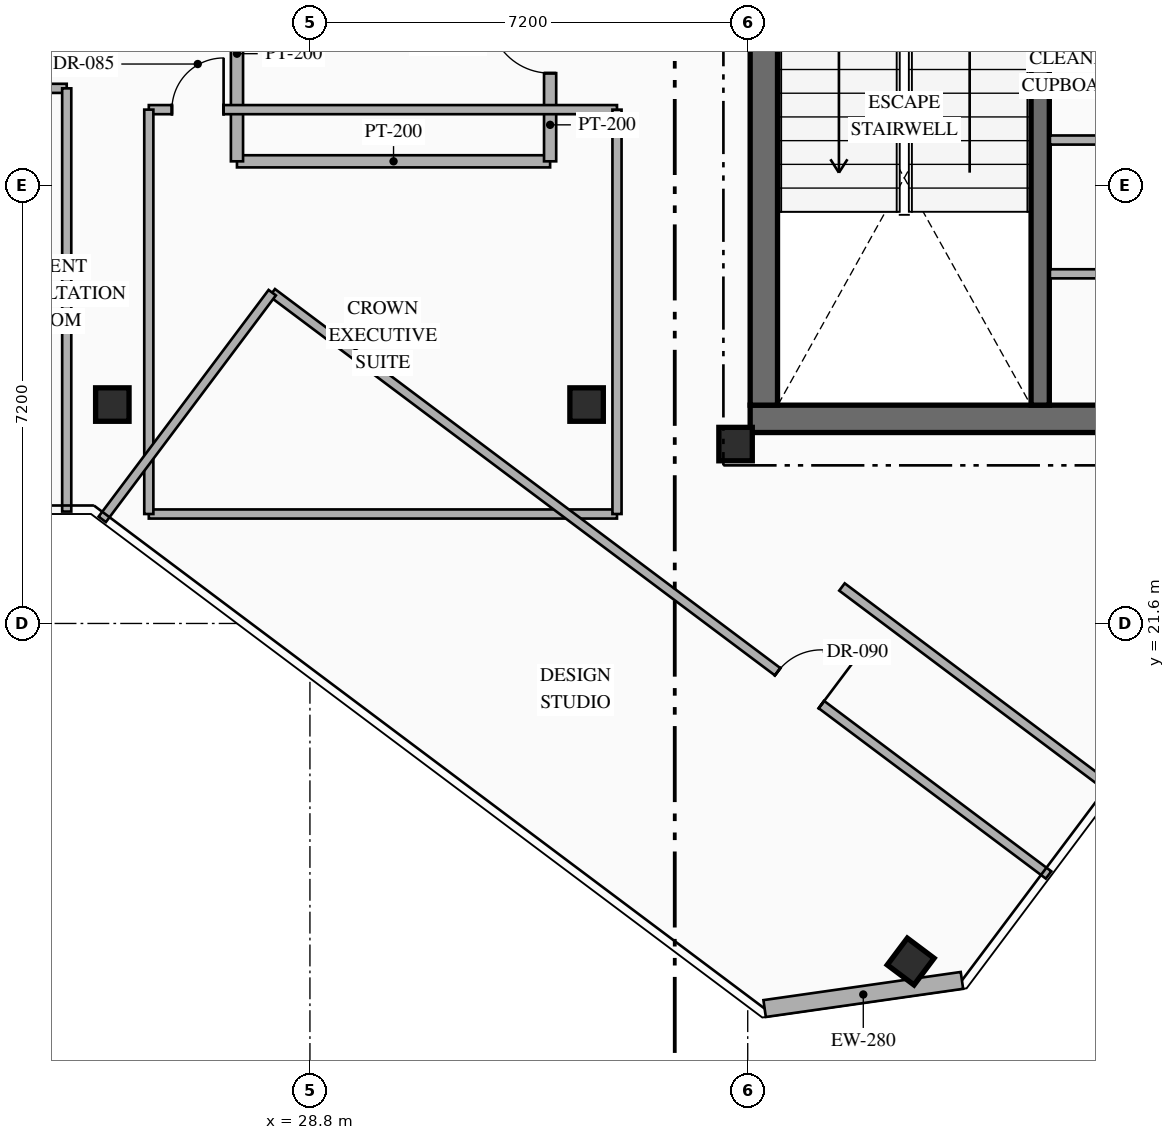
"""IFC4 building model, lengths in metres.
Left out: names, types, materials, properties, quantities, classifications, styles, units other than length and angle.
Written with IfcOpenShell. Run it as: python <this file> out.ifc"""

import sys

from ifc_helpers import new_model, si_unit, direction, frame, frame_2d, origin, origin_2d, place, context, subcontext, project, spatial, rectangle, hollow_rectangle, extrude, element, fill, save


model = new_model("IFC4")
c1 = context("Model", 3, precision=1e-05, world=origin(), true_north=direction((0.0, 1.0)))
c2 = subcontext(c1, "Body", "Model", "MODEL_VIEW")
j1 = project(units=[si_unit("LENGTHUNIT", "METRE"), si_unit("PLANEANGLEUNIT", "RADIAN")], contexts=[c1])
p1 = place(None, origin())
s1 = spatial("IfcSite", under=j1, at=p1, CompositionType="ELEMENT")
p2 = place(p1, origin())
s2 = spatial("IfcBuilding", under=s1, at=p2, CompositionType="ELEMENT")
p3 = place(p2, frame((0.0, 0.0, 285.95)))
s3 = spatial("IfcBuildingStorey", under=s2, at=p3, CompositionType="ELEMENT", Elevation=285.95)
p4 = place(p3, frame((36.04, 24.965, 0.0), z_axis=(0.0, 0.0, 1.0), x_axis=(1.0, 0.0, 0.0)))
e1 = element("IfcWall", 1, at=p4, inside=s3, PredefinedType="SHEAR", context=c2, shape_type="SweptSolid", body=[
    extrude(rectangle(XDim=7.46, YDim=0.45, at=frame_2d((3.73, 0.0))), origin(), (0.0, 0.0, 1.0), 4.0),
])
p5 = place(p3, frame((36.265, 25.19, 0.0), z_axis=(0.0, 0.0, 1.0), x_axis=(0.0, 1.0, 0.0)))
e2 = element("IfcWall", 2, at=p5, inside=s3, PredefinedType="SHEAR", context=c2, shape_type="SweptSolid", body=[
    extrude(rectangle(XDim=9.48, YDim=0.45, at=frame_2d((4.74, 0.0))), origin(), (0.0, 0.0, 1.0), 4.0),
])
p6 = place(p3, frame((40.81, 25.19, 0.0), z_axis=(0.0, 0.0, 1.0), x_axis=(0.0, 1.0, 0.0)))
e3 = element("IfcWall", 3, at=p6, inside=s3, PredefinedType="SHEAR", context=c2, shape_type="SweptSolid", body=[
    extrude(rectangle(XDim=9.48, YDim=0.3, at=frame_2d((4.74, 0.0))), origin(), (0.0, 0.0, 1.0), 4.0),
])
for number, where, z_axis, x_axis in (
    (4, (35.8, 24.55, 0.0), (0.0, 0.0, 1.0), (1.0, 0.0, 0.0)),
    (5, (25.55, 25.2, 0.0), (0.0, 0.0, 1.0), (1.0, 0.0, 0.0)),
    (6, (33.35, 25.2, 0.0), (0.0, 0.0, 1.0), (1.0, 0.0, 0.0)),
    (7, (38.68, 16.04, 0.0), (0.0, 0.0, 1.0), (0.8, -0.6, 0.0)),
):
    element("IfcColumn", number, at=place(p3, frame(where, z_axis=z_axis, x_axis=x_axis)), inside=s3, PredefinedType="COLUMN", context=c2, shape_type="SweptSolid", body=[
        extrude(hollow_rectangle(XDim=0.55, YDim=0.55, WallThickness=0.022, at=origin_2d()), origin(), (0.0, 0.0, 1.0), 4.0),
    ])
p7 = place(p3, frame((39.523, 15.73, 0.0), z_axis=(0.0, 0.0, 1.0), x_axis=(-0.989977778067, -0.141223223777, 0.0)))
e8 = element("IfcWall", 8, at=p7, inside=s3, PredefinedType="STANDARD", context=c2, shape_type="SweptSolid", body=[
    extrude(rectangle(XDim=3.278, YDim=0.28, at=frame_2d((1.639, 0.0))), origin(), (0.0, 0.0, 1.0), 3.7),
])
for number, where, z_axis, x_axis in (
    (9, (40.97, 27.35, 0.0), (0.0, 0.0, 1.0), (1.0, 0.0, 0.0)),
    (10, (40.97, 29.55, 0.0), (0.0, 0.0, 1.0), (1.0, 0.0, 0.0)),
):
    element("IfcWall", number, at=place(p3, frame(where, z_axis=z_axis, x_axis=x_axis)), inside=s3, PredefinedType="PARTITIONING", context=c2, shape_type="SweptSolid", body=[
        extrude(rectangle(XDim=2.08, YDim=0.15, at=frame_2d((1.04, 0.0))), origin(), (0.0, 0.0, 1.0), 3.7),
    ])
p8 = place(p3, frame((27.6, 29.2, 0.0), z_axis=(0.0, 0.0, 1.0), x_axis=(1.0, 0.0, 0.0)))
e11 = element("IfcWall", 11, at=p8, inside=s3, PredefinedType="STANDARD", context=c2, shape_type="SweptSolid", body=[
    extrude(rectangle(XDim=5.15, YDim=0.2, at=frame_2d((2.575, 0.0))), origin(), (0.0, 0.0, 1.0), 3.7),
])
p9 = place(p3, frame((27.6, 29.2, 0.0), z_axis=(0.0, 0.0, 1.0), x_axis=(0.0, 1.0, 0.0)))
e12 = element("IfcWall", 12, at=p9, inside=s3, PredefinedType="STANDARD", context=c2, shape_type="SweptSolid", body=[
    extrude(rectangle(XDim=3.54, YDim=0.2, at=frame_2d((1.77, 0.0))), origin(), (0.0, 0.0, 1.0), 3.7),
])
p10 = place(p3, frame((32.75, 29.2, 0.0), z_axis=(0.0, 0.0, 1.0), x_axis=(0.0, 1.0, 0.0)))
e13 = element("IfcWall", 13, at=p10, inside=s3, PredefinedType="STANDARD", context=c2, shape_type="SweptSolid", body=[
    extrude(rectangle(XDim=3.54, YDim=0.2, at=frame_2d((1.77, 0.0))), origin(), (0.0, 0.0, 1.0), 3.7),
])
p11 = place(p10, frame((1.45, 0.0, 0.0)))
e14 = element("IfcOpeningElement", 14, at=p11, cuts=e13, PredefinedType="OPENING", context=c2, shape_type="SweptSolid", body=[
    extrude(rectangle(XDim=1.0, YDim=2.2, at=frame_2d((0.5, 1.1))), frame((0.0, 0.11, 0.0), z_axis=(0.0, -1.0, 0.0), x_axis=(1.0, 0.0, 0.0)), (0.0, 0.0, 1.0), 0.22),
])
p12 = place(p3, frame((26.15, 23.4, 0.0), z_axis=(0.0, 0.0, 1.0), x_axis=(1.0, 0.0, 0.0)))
e15 = element("IfcWall", 15, at=p12, inside=s3, PredefinedType="PARTITIONING", context=c2, shape_type="SweptSolid", body=[
    extrude(rectangle(XDim=7.7, YDim=0.15, at=frame_2d((3.85, 0.0))), origin(), (0.0, 0.0, 1.0), 3.7),
])
p13 = place(p3, frame((26.15, 30.05, 0.0), z_axis=(0.0, 0.0, 1.0), x_axis=(1.0, 0.0, 0.0)))
e16 = element("IfcWall", 16, at=p13, inside=s3, PredefinedType="PARTITIONING", context=c2, shape_type="SweptSolid", body=[
    extrude(rectangle(XDim=7.7, YDim=0.15, at=frame_2d((3.85, 0.0))), origin(), (0.0, 0.0, 1.0), 3.7),
])
p14 = place(p13, frame((0.38, 0.0, 0.0)))
e17 = element("IfcOpeningElement", 17, at=p14, cuts=e16, PredefinedType="OPENING", context=c2, shape_type="SweptSolid", body=[
    extrude(rectangle(XDim=0.85, YDim=2.08, at=frame_2d((0.425, 1.04))), frame((0.0, 0.085, 0.0), z_axis=(0.0, -1.0, 0.0), x_axis=(1.0, 0.0, 0.0)), (0.0, 0.0, 1.0), 0.17),
])
for number, where, z_axis, x_axis in (
    (18, (26.15, 23.4, 0.0), (0.0, 0.0, 1.0), (0.0, 1.0, 0.0)),
    (19, (33.85, 23.4, 0.0), (0.0, 0.0, 1.0), (0.0, 1.0, 0.0)),
):
    element("IfcWall", number, at=place(p3, frame(where, z_axis=z_axis, x_axis=x_axis)), inside=s3, PredefinedType="PARTITIONING", context=c2, shape_type="SweptSolid", body=[
        extrude(rectangle(XDim=6.65, YDim=0.15, at=frame_2d((3.325, 0.0))), origin(), (0.0, 0.0, 1.0), 3.7),
    ])
p15 = place(p3, frame((22.85, 30.4, 0.0), z_axis=(0.0, 0.0, 1.0), x_axis=(1.0, 0.0, 0.0)))
e20 = element("IfcWall", 20, at=p15, inside=s3, PredefinedType="PARTITIONING", context=c2, shape_type="SweptSolid", body=[
    extrude(rectangle(XDim=1.95, YDim=0.15, at=frame_2d((0.975, 0.0))), origin(), (0.0, 0.0, 1.0), 3.7),
])
p16 = place(p15, frame((0.55, 0.0, 0.0)))
e21 = element("IfcOpeningElement", 21, at=p16, cuts=e20, PredefinedType="OPENING", context=c2, shape_type="SweptSolid", body=[
    extrude(rectangle(XDim=0.85, YDim=2.08, at=frame_2d((0.425, 1.04))), frame((0.0, 0.085, 0.0), z_axis=(0.0, -1.0, 0.0), x_axis=(1.0, 0.0, 0.0)), (0.0, 0.0, 1.0), 0.17),
])
p17 = place(p3, frame((24.8, 23.44, 0.0), z_axis=(0.0, 0.0, 1.0), x_axis=(0.0, 1.0, 0.0)))
e22 = element("IfcWall", 22, at=p17, inside=s3, PredefinedType="PARTITIONING", context=c2, shape_type="SweptSolid", body=[
    extrude(rectangle(XDim=6.96, YDim=0.15, at=frame_2d((3.48, 0.0))), origin(), (0.0, 0.0, 1.0), 3.7),
])
p18 = place(p3, frame((28.18, 27.04, 0.0), z_axis=(0.0, 0.0, 1.0), x_axis=(0.80000367127, -0.599995104942, 0.0)))
e23 = element("IfcWall", 23, at=p18, inside=s3, PredefinedType="PARTITIONING", context=c2, shape_type="SweptSolid", body=[
    extrude(rectangle(XDim=15.96, YDim=0.15, at=frame_2d((7.98, 0.0))), origin(), (0.0, 0.0, 1.0), 3.7),
])
p19 = place(p18, frame((10.39, 0.0, 0.0)))
e24 = element("IfcOpeningElement", 24, at=p19, cuts=e23, PredefinedType="OPENING", context=c2, shape_type="SweptSolid", body=[
    extrude(rectangle(XDim=0.9, YDim=2.15, at=frame_2d((0.45, 1.075))), frame((0.0, 0.085, 0.0), z_axis=(0.0, -1.0, 0.0), x_axis=(1.0, 0.0, 0.0)), (0.0, 0.0, 1.0), 0.17),
])
p20 = place(p3, frame((25.384, 23.312, 0.0), z_axis=(0.0, 0.0, 1.0), x_axis=(0.599983234706, 0.800012573696, 0.0)))
e25 = element("IfcWall", 25, at=p20, inside=s3, PredefinedType="PARTITIONING", context=c2, shape_type="SweptSolid", body=[
    extrude(rectangle(XDim=4.66, YDim=0.15, at=frame_2d((2.33, 0.0))), origin(), (0.0, 0.0, 1.0), 3.7),
])
p21 = place(p3, frame((37.55, 22.2, 0.0), z_axis=(0.0, 0.0, 1.0), x_axis=(0.800005269228, -0.599992974298, 0.0)))
e26 = element("IfcWall", 26, at=p21, inside=s3, PredefinedType="PARTITIONING", context=c2, shape_type="SweptSolid", body=[
    extrude(rectangle(XDim=5.56, YDim=0.15, at=frame_2d((2.78, 0.0))), origin(), (0.0, 0.0, 1.0), 3.7),
])
p22 = place(p11, origin())
e27 = element("IfcDoor", 27, at=p22, inside=s3, OperationType="SINGLE_SWING_RIGHT", PredefinedType="DOOR", context=c2, shape_type="SweptSolid", body=[
    extrude(rectangle(XDim=1.0, YDim=2.2, at=frame_2d((0.5, 1.1))), frame((0.0, 0.025, 0.0), z_axis=(0.0, -1.0, 0.0), x_axis=(1.0, 0.0, 0.0)), (0.0, 0.0, 1.0), 0.05),
])
fill(e14, e27)
p23 = place(p14, origin())
e28 = element("IfcDoor", 28, at=p23, inside=s3, OperationType="SINGLE_SWING_RIGHT", PredefinedType="DOOR", context=c2, shape_type="SweptSolid", body=[
    extrude(rectangle(XDim=0.85, YDim=2.08, at=frame_2d((0.425, 1.04))), frame((0.0, 0.025, 0.0), z_axis=(0.0, -1.0, 0.0), x_axis=(1.0, 0.0, 0.0)), (0.0, 0.0, 1.0), 0.05),
])
fill(e17, e28)
p24 = place(p19, origin())
e29 = element("IfcDoor", 29, at=p24, inside=s3, OperationType="SINGLE_SWING_RIGHT", PredefinedType="DOOR", context=c2, shape_type="SweptSolid", body=[
    extrude(rectangle(XDim=0.9, YDim=2.15, at=frame_2d((0.45, 1.075))), frame((0.0, 0.025, 0.0), z_axis=(0.0, -1.0, 0.0), x_axis=(1.0, 0.0, 0.0)), (0.0, 0.0, 1.0), 0.05),
])
fill(e24, e29)
save(model, sys.argv[1])
